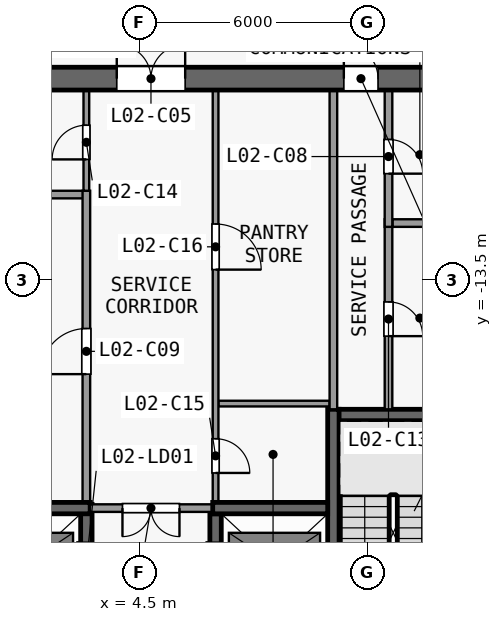
"""IFC4 building model, lengths in metres.
Left out: names, types, materials, properties, quantities, classifications, styles, units other than length and angle.
Written with IfcOpenShell. Run it as: python <this file> out.ifc"""

import sys

from ifc_helpers import new_model, si_unit, direction, frame, frame_2d, origin, place, context, subcontext, project, spatial, rectangle, extrude, element, fill, save


model = new_model("IFC4")
c1 = context("Model", 3, precision=1e-05, world=origin(), true_north=direction((0.0, 1.0)))
c2 = subcontext(c1, "Body", "Model", "MODEL_VIEW")
j1 = project(units=[si_unit("LENGTHUNIT", "METRE"), si_unit("PLANEANGLEUNIT", "RADIAN")], contexts=[c1])
p1 = place(None, origin())
s1 = spatial("IfcSite", under=j1, at=p1, CompositionType="ELEMENT")
p2 = place(p1, origin())
s2 = spatial("IfcBuilding", under=s1, at=p2, CompositionType="ELEMENT")
p3 = place(p2, frame((0.0, 0.0, 13.5)))
s3 = spatial("IfcBuildingStorey", under=s2, at=p3, CompositionType="ELEMENT", Elevation=13.5)
p4 = place(p3, frame((-13.5, -8.2, 0.0), z_axis=(0.0, 0.0, 1.0), x_axis=(1.0, 0.0, 0.0)))
e1 = element("IfcWall", 1, at=p4, inside=s3, PredefinedType="SHEAR", context=c2, shape_type="SweptSolid", body=[
    extrude(rectangle(XDim=27.0, YDim=0.6, at=frame_2d((13.5, 0.0))), origin(), (0.0, 0.0, 1.0), 4.65),
])
p5 = place(p4, frame((7.8, 0.0, 0.0)))
e2 = element("IfcOpeningElement", 2, at=p5, cuts=e1, PredefinedType="OPENING", context=c2, shape_type="SweptSolid", body=[
    extrude(rectangle(XDim=1.8, YDim=2.1, at=frame_2d((0.9, 1.05))), frame((0.0, 0.31, 0.0), z_axis=(0.0, -1.0, 0.0), x_axis=(1.0, 0.0, 0.0)), (0.0, 0.0, 1.0), 0.62),
])
p6 = place(p4, frame((17.4, 0.0, 0.0)))
e3 = element("IfcOpeningElement", 3, at=p6, cuts=e1, PredefinedType="OPENING", context=c2, shape_type="SweptSolid", body=[
    extrude(rectangle(XDim=1.8, YDim=2.1, at=frame_2d((0.9, 1.05))), frame((0.0, 0.31, 0.0), z_axis=(0.0, -1.0, 0.0), x_axis=(1.0, 0.0, 0.0)), (0.0, 0.0, 1.0), 0.62),
])
p7 = place(p4, frame((2.725, 0.0, 0.0)))
e4 = element("IfcOpeningElement", 4, at=p7, cuts=e1, PredefinedType="OPENING", context=c2, shape_type="SweptSolid", body=[
    extrude(rectangle(XDim=0.9, YDim=2.1, at=frame_2d((0.45, 1.05))), frame((0.0, 0.31, 0.0), z_axis=(0.0, -1.0, 0.0), x_axis=(1.0, 0.0, 0.0)), (0.0, 0.0, 1.0), 0.62),
])
p8 = place(p4, frame((23.375, 0.0, 0.0)))
e5 = element("IfcOpeningElement", 5, at=p8, cuts=e1, PredefinedType="OPENING", context=c2, shape_type="SweptSolid", body=[
    extrude(rectangle(XDim=0.9, YDim=2.1, at=frame_2d((0.45, 1.05))), frame((0.0, 0.31, 0.0), z_axis=(0.0, -1.0, 0.0), x_axis=(1.0, 0.0, 0.0)), (0.0, 0.0, 1.0), 0.62),
])
p9 = place(p3, frame((0.15, -19.5, 0.0), z_axis=(0.0, 0.0, 1.0), x_axis=(1.0, 0.0, 0.0)))
e6 = element("IfcWall", 6, at=p9, inside=s3, PredefinedType="SHEAR", context=c2, shape_type="SweptSolid", body=[
    extrude(rectangle(XDim=3.05, YDim=0.3, at=frame_2d((1.525, 0.0))), origin(), (0.0, 0.0, 1.0), 4.65),
])
p10 = place(p3, frame((6.575, -19.5, 0.0), z_axis=(0.0, 0.0, 1.0), x_axis=(-1.0, 0.0, 0.0)))
e7 = element("IfcWall", 7, at=p10, inside=s3, PredefinedType="PARTITIONING", context=c2, shape_type="SweptSolid", body=[
    extrude(rectangle(XDim=3.375, YDim=0.2, at=frame_2d((1.688, 0.0))), origin(), (0.0, 0.0, 1.0), 4.65),
])
p11 = place(p10, frame((1.025, 0.0, 0.0)))
e8 = element("IfcOpeningElement", 8, at=p11, cuts=e7, PredefinedType="OPENING", context=c2, shape_type="SweptSolid", body=[
    extrude(rectangle(XDim=1.5, YDim=2.1, at=frame_2d((0.75, 1.05))), frame((0.0, 0.11, 0.0), z_axis=(0.0, -1.0, 0.0), x_axis=(1.0, 0.0, 0.0)), (0.0, 0.0, 1.0), 0.22),
])
p12 = place(p3, frame((6.425, -19.5, 0.0), z_axis=(0.0, 0.0, 1.0), x_axis=(1.0, 0.0, 0.0)))
e9 = element("IfcWall", 9, at=p12, inside=s3, PredefinedType="SHEAR", context=c2, shape_type="SweptSolid", body=[
    extrude(rectangle(XDim=3.025, YDim=0.3, at=frame_2d((1.512, 0.0))), origin(), (0.0, 0.0, 1.0), 4.65),
])
p13 = place(p3, frame((9.5, -17.05, 0.0), z_axis=(0.0, 0.0, 1.0), x_axis=(1.0, 0.0, 0.0)))
e10 = element("IfcWall", 10, at=p13, inside=s3, PredefinedType="SHEAR", context=c2, shape_type="SweptSolid", body=[
    extrude(rectangle(XDim=3.1, YDim=0.3, at=frame_2d((1.55, 0.0))), origin(), (0.0, 0.0, 1.0), 4.65),
])
p14 = place(p3, frame((6.575, -16.75, 0.0), z_axis=(0.0, 0.0, 1.0), x_axis=(1.0, 0.0, 0.0)))
e11 = element("IfcWall", 11, at=p14, inside=s3, PredefinedType="PARTITIONING", context=c2, shape_type="SweptSolid", body=[
    extrude(rectangle(XDim=2.925, YDim=0.15, at=frame_2d((1.462, 0.0))), origin(), (0.0, 0.0, 1.0), 4.65),
])
p15 = place(p3, frame((11.15, -12.0, 0.0), z_axis=(0.0, 0.0, 1.0), x_axis=(1.0, 0.0, 0.0)))
e12 = element("IfcWall", 12, at=p15, inside=s3, PredefinedType="PARTITIONING", context=c2, shape_type="SweptSolid", body=[
    extrude(rectangle(XDim=1.45, YDim=0.2, at=frame_2d((0.725, 0.0))), origin(), (0.0, 0.0, 1.0), 4.65),
])
p16 = place(p3, frame((0.15, -11.25, 0.0), z_axis=(0.0, 0.0, 1.0), x_axis=(1.0, 0.0, 0.0)))
e13 = element("IfcWall", 13, at=p16, inside=s3, PredefinedType="PARTITIONING", context=c2, shape_type="SweptSolid", body=[
    extrude(rectangle(XDim=3.025, YDim=0.2, at=frame_2d((1.513, 0.0))), origin(), (0.0, 0.0, 1.0), 4.65),
])
p17 = place(p3, frame((3.1, -22.25, 0.0), z_axis=(0.0, 0.0, 1.0), x_axis=(0.0, 1.0, 0.0)))
e14 = element("IfcWall", 14, at=p17, inside=s3, PredefinedType="SHEAR", context=c2, shape_type="SweptSolid", body=[
    extrude(rectangle(XDim=2.85, YDim=0.3, at=frame_2d((1.425, 0.0))), origin(), (0.0, 0.0, 1.0), 4.65),
])
p18 = place(p17, frame((0.75, 0.0, 0.0)))
e15 = element("IfcOpeningElement", 15, at=p18, cuts=e14, PredefinedType="OPENING", context=c2, shape_type="SweptSolid", body=[
    extrude(rectangle(XDim=1.1, YDim=2.1, at=frame_2d((0.55, 1.05))), frame((0.0, 0.16, 0.0), z_axis=(0.0, -1.0, 0.0), x_axis=(1.0, 0.0, 0.0)), (0.0, 0.0, 1.0), 0.32),
])
p19 = place(p3, frame((3.1, -19.6, 0.0), z_axis=(0.0, 0.0, 1.0), x_axis=(0.0, 1.0, 0.0)))
e16 = element("IfcWall", 16, at=p19, inside=s3, PredefinedType="PARTITIONING", context=c2, shape_type="SweptSolid", body=[
    extrude(rectangle(XDim=8.45, YDim=0.2, at=frame_2d((4.225, 0.0))), origin(), (0.0, 0.0, 1.0), 4.65),
])
p20 = place(p19, frame((3.625, 0.0, 0.0)))
e17 = element("IfcOpeningElement", 17, at=p20, cuts=e16, PredefinedType="OPENING", context=c2, shape_type="SweptSolid", body=[
    extrude(rectangle(XDim=1.2, YDim=2.1, at=frame_2d((0.6, 1.05))), frame((0.0, 0.11, 0.0), z_axis=(0.0, -1.0, 0.0), x_axis=(1.0, 0.0, 0.0)), (0.0, 0.0, 1.0), 0.22),
])
p21 = place(p3, frame((3.1, -11.15, 0.0), z_axis=(0.0, 0.0, 1.0), x_axis=(0.0, 1.0, 0.0)))
e18 = element("IfcWall", 18, at=p21, inside=s3, PredefinedType="PARTITIONING", context=c2, shape_type="SweptSolid", body=[
    extrude(rectangle(XDim=2.65, YDim=0.15, at=frame_2d((1.325, 0.0))), origin(), (0.0, 0.0, 1.0), 4.65),
])
p22 = place(p21, frame((0.825, 0.0, 0.0)))
e19 = element("IfcOpeningElement", 19, at=p22, cuts=e18, PredefinedType="OPENING", context=c2, shape_type="SweptSolid", body=[
    extrude(rectangle(XDim=0.9, YDim=2.1, at=frame_2d((0.45, 1.05))), frame((0.0, 0.085, 0.0), z_axis=(0.0, -1.0, 0.0), x_axis=(1.0, 0.0, 0.0)), (0.0, 0.0, 1.0), 0.17),
])
p23 = place(p3, frame((6.5, -22.25, 0.0), z_axis=(0.0, 0.0, 1.0), x_axis=(0.0, 1.0, 0.0)))
e20 = element("IfcWall", 20, at=p23, inside=s3, PredefinedType="SHEAR", context=c2, shape_type="SweptSolid", body=[
    extrude(rectangle(XDim=2.6, YDim=0.3, at=frame_2d((1.3, 0.0))), origin(), (0.0, 0.0, 1.0), 4.65),
])
p24 = place(p23, frame((0.75, 0.0, 0.0)))
e21 = element("IfcOpeningElement", 21, at=p24, cuts=e20, PredefinedType="OPENING", context=c2, shape_type="SweptSolid", body=[
    extrude(rectangle(XDim=1.1, YDim=2.1, at=frame_2d((0.55, 1.05))), frame((0.0, 0.16, 0.0), z_axis=(0.0, -1.0, 0.0), x_axis=(1.0, 0.0, 0.0)), (0.0, 0.0, 1.0), 0.32),
])
p25 = place(p3, frame((6.5, -8.5, 0.0), z_axis=(0.0, 0.0, 1.0), x_axis=(0.0, -1.0, 0.0)))
e22 = element("IfcWall", 22, at=p25, inside=s3, PredefinedType="PARTITIONING", context=c2, shape_type="SweptSolid", body=[
    extrude(rectangle(XDim=10.85, YDim=0.15, at=frame_2d((5.425, 0.0))), origin(), (0.0, 0.0, 1.0), 4.65),
])
p26 = place(p25, frame((9.175, 0.0, 0.0)))
e23 = element("IfcOpeningElement", 23, at=p26, cuts=e22, PredefinedType="OPENING", context=c2, shape_type="SweptSolid", body=[
    extrude(rectangle(XDim=0.9, YDim=2.1, at=frame_2d((0.45, 1.05))), frame((0.0, 0.085, 0.0), z_axis=(0.0, -1.0, 0.0), x_axis=(1.0, 0.0, 0.0)), (0.0, 0.0, 1.0), 0.17),
])
p27 = place(p25, frame((3.525, 0.0, 0.0)))
e24 = element("IfcOpeningElement", 24, at=p27, cuts=e22, PredefinedType="OPENING", context=c2, shape_type="SweptSolid", body=[
    extrude(rectangle(XDim=1.2, YDim=2.1, at=frame_2d((0.6, 1.05))), frame((0.0, 0.085, 0.0), z_axis=(0.0, -1.0, 0.0), x_axis=(1.0, 0.0, 0.0)), (0.0, 0.0, 1.0), 0.17),
])
p28 = place(p3, frame((9.6, -16.9, 0.0), z_axis=(0.0, 0.0, 1.0), x_axis=(0.0, -1.0, 0.0)))
e25 = element("IfcWall", 25, at=p28, inside=s3, PredefinedType="SHEAR", context=c2, shape_type="SweptSolid", body=[
    extrude(rectangle(XDim=7.7, YDim=0.3, at=frame_2d((3.85, 0.0))), origin(), (0.0, 0.0, 1.0), 4.65),
])
p29 = place(p28, frame((6.5, 0.0, 0.0)))
e26 = element("IfcOpeningElement", 26, at=p29, cuts=e25, PredefinedType="OPENING", context=c2, shape_type="SweptSolid", body=[
    extrude(rectangle(XDim=1.1, YDim=2.1, at=frame_2d((0.55, 1.05))), frame((0.0, 0.16, 0.0), z_axis=(0.0, -1.0, 0.0), x_axis=(1.0, 0.0, 0.0)), (0.0, 0.0, 1.0), 0.32),
])
p30 = place(p3, frame((9.6, -16.9, 0.0), z_axis=(0.0, 0.0, 1.0), x_axis=(0.0, 1.0, 0.0)))
e27 = element("IfcWall", 27, at=p30, inside=s3, PredefinedType="PARTITIONING", context=c2, shape_type="SweptSolid", body=[
    extrude(rectangle(XDim=8.4, YDim=0.2, at=frame_2d((4.2, 0.0))), origin(), (0.0, 0.0, 1.0), 4.65),
])
p31 = place(p3, frame((11.05, -11.9, 0.0), z_axis=(0.0, 0.0, 1.0), x_axis=(0.0, -1.0, 0.0)))
e28 = element("IfcWall", 28, at=p31, inside=s3, PredefinedType="PARTITIONING", context=c2, shape_type="SweptSolid", body=[
    extrude(rectangle(XDim=5.0, YDim=0.2, at=frame_2d((2.5, 0.0))), origin(), (0.0, 0.0, 1.0), 4.65),
])
p32 = place(p31, frame((2.175, 0.0, 0.0)))
e29 = element("IfcOpeningElement", 29, at=p32, cuts=e28, PredefinedType="OPENING", context=c2, shape_type="SweptSolid", body=[
    extrude(rectangle(XDim=0.9, YDim=2.1, at=frame_2d((0.45, 1.05))), frame((0.0, 0.11, 0.0), z_axis=(0.0, -1.0, 0.0), x_axis=(1.0, 0.0, 0.0)), (0.0, 0.0, 1.0), 0.22),
])
p33 = place(p3, frame((11.05, -8.5, 0.0), z_axis=(0.0, 0.0, 1.0), x_axis=(0.0, -1.0, 0.0)))
e30 = element("IfcWall", 30, at=p33, inside=s3, PredefinedType="PARTITIONING", context=c2, shape_type="SweptSolid", body=[
    extrude(rectangle(XDim=3.6, YDim=0.2, at=frame_2d((1.8, 0.0))), origin(), (0.0, 0.0, 1.0), 4.65),
])
p34 = place(p33, frame((1.3, 0.0, 0.0)))
e31 = element("IfcOpeningElement", 31, at=p34, cuts=e30, PredefinedType="OPENING", context=c2, shape_type="SweptSolid", body=[
    extrude(rectangle(XDim=0.9, YDim=2.1, at=frame_2d((0.45, 1.05))), frame((0.0, 0.11, 0.0), z_axis=(0.0, -1.0, 0.0), x_axis=(1.0, 0.0, 0.0)), (0.0, 0.0, 1.0), 0.22),
])
p35 = place(p11, origin())
e32 = element("IfcDoor", 32, at=p35, inside=s3, OperationType="DOUBLE_DOOR_SINGLE_SWING", PredefinedType="DOOR", context=c2, shape_type="SweptSolid", body=[
    extrude(rectangle(XDim=1.5, YDim=2.1, at=frame_2d((0.75, 1.05))), frame((0.0, 0.025, 0.0), z_axis=(0.0, -1.0, 0.0), x_axis=(1.0, 0.0, 0.0)), (0.0, 0.0, 1.0), 0.05),
])
fill(e8, e32)
p36 = place(p6, origin())
e33 = element("IfcDoor", 33, at=p36, inside=s3, OperationType="DOUBLE_DOOR_SINGLE_SWING", PredefinedType="DOOR", context=c2, shape_type="SweptSolid", body=[
    extrude(rectangle(XDim=1.8, YDim=2.1, at=frame_2d((0.9, 1.05))), frame((0.0, 0.025, 0.0), z_axis=(0.0, -1.0, 0.0), x_axis=(1.0, 0.0, 0.0)), (0.0, 0.0, 1.0), 0.05),
])
fill(e3, e33)
p37 = place(p34, origin())
e34 = element("IfcDoor", 34, at=p37, inside=s3, OperationType="SINGLE_SWING_RIGHT", PredefinedType="DOOR", context=c2, shape_type="SweptSolid", body=[
    extrude(rectangle(XDim=0.9, YDim=2.1, at=frame_2d((0.45, 1.05))), frame((0.0, 0.025, 0.0), z_axis=(0.0, -1.0, 0.0), x_axis=(1.0, 0.0, 0.0)), (0.0, 0.0, 1.0), 0.05),
])
fill(e31, e34)
p38 = place(p20, origin())
e35 = element("IfcDoor", 35, at=p38, inside=s3, OperationType="SINGLE_SWING_LEFT", PredefinedType="DOOR", context=c2, shape_type="SweptSolid", body=[
    extrude(rectangle(XDim=1.2, YDim=2.1, at=frame_2d((0.6, 1.05))), frame((0.0, 0.025, 0.0), z_axis=(0.0, -1.0, 0.0), x_axis=(1.0, 0.0, 0.0)), (0.0, 0.0, 1.0), 0.05),
])
fill(e17, e35)
p39 = place(p8, origin())
e36 = element("IfcDoor", 36, at=p39, inside=s3, OperationType="SINGLE_SWING_LEFT", PredefinedType="DOOR", context=c2, shape_type="SweptSolid", body=[
    extrude(rectangle(XDim=0.9, YDim=2.1, at=frame_2d((0.45, 1.05))), frame((0.0, 0.025, 0.0), z_axis=(0.0, -1.0, 0.0), x_axis=(1.0, 0.0, 0.0)), (0.0, 0.0, 1.0), 0.05),
])
fill(e5, e36)
p40 = place(p32, origin())
e37 = element("IfcDoor", 37, at=p40, inside=s3, OperationType="SINGLE_SWING_RIGHT", PredefinedType="DOOR", context=c2, shape_type="SweptSolid", body=[
    extrude(rectangle(XDim=0.9, YDim=2.1, at=frame_2d((0.45, 1.05))), frame((0.0, 0.025, 0.0), z_axis=(0.0, -1.0, 0.0), x_axis=(1.0, 0.0, 0.0)), (0.0, 0.0, 1.0), 0.05),
])
fill(e29, e37)
p41 = place(p22, origin())
e38 = element("IfcDoor", 38, at=p41, inside=s3, OperationType="SINGLE_SWING_LEFT", PredefinedType="DOOR", context=c2, shape_type="SweptSolid", body=[
    extrude(rectangle(XDim=0.9, YDim=2.1, at=frame_2d((0.45, 1.05))), frame((0.0, 0.025, 0.0), z_axis=(0.0, -1.0, 0.0), x_axis=(1.0, 0.0, 0.0)), (0.0, 0.0, 1.0), 0.05),
])
fill(e19, e38)
p42 = place(p26, origin())
e39 = element("IfcDoor", 39, at=p42, inside=s3, OperationType="SINGLE_SWING_RIGHT", PredefinedType="DOOR", context=c2, shape_type="SweptSolid", body=[
    extrude(rectangle(XDim=0.9, YDim=2.1, at=frame_2d((0.45, 1.05))), frame((0.0, 0.025, 0.0), z_axis=(0.0, -1.0, 0.0), x_axis=(1.0, 0.0, 0.0)), (0.0, 0.0, 1.0), 0.05),
])
fill(e23, e39)
p43 = place(p27, origin())
e40 = element("IfcDoor", 40, at=p43, inside=s3, OperationType="SINGLE_SWING_RIGHT", PredefinedType="DOOR", context=c2, shape_type="SweptSolid", body=[
    extrude(rectangle(XDim=1.2, YDim=2.1, at=frame_2d((0.6, 1.05))), frame((0.0, 0.025, 0.0), z_axis=(0.0, -1.0, 0.0), x_axis=(1.0, 0.0, 0.0)), (0.0, 0.0, 1.0), 0.05),
])
fill(e24, e40)
save(model, sys.argv[1])
